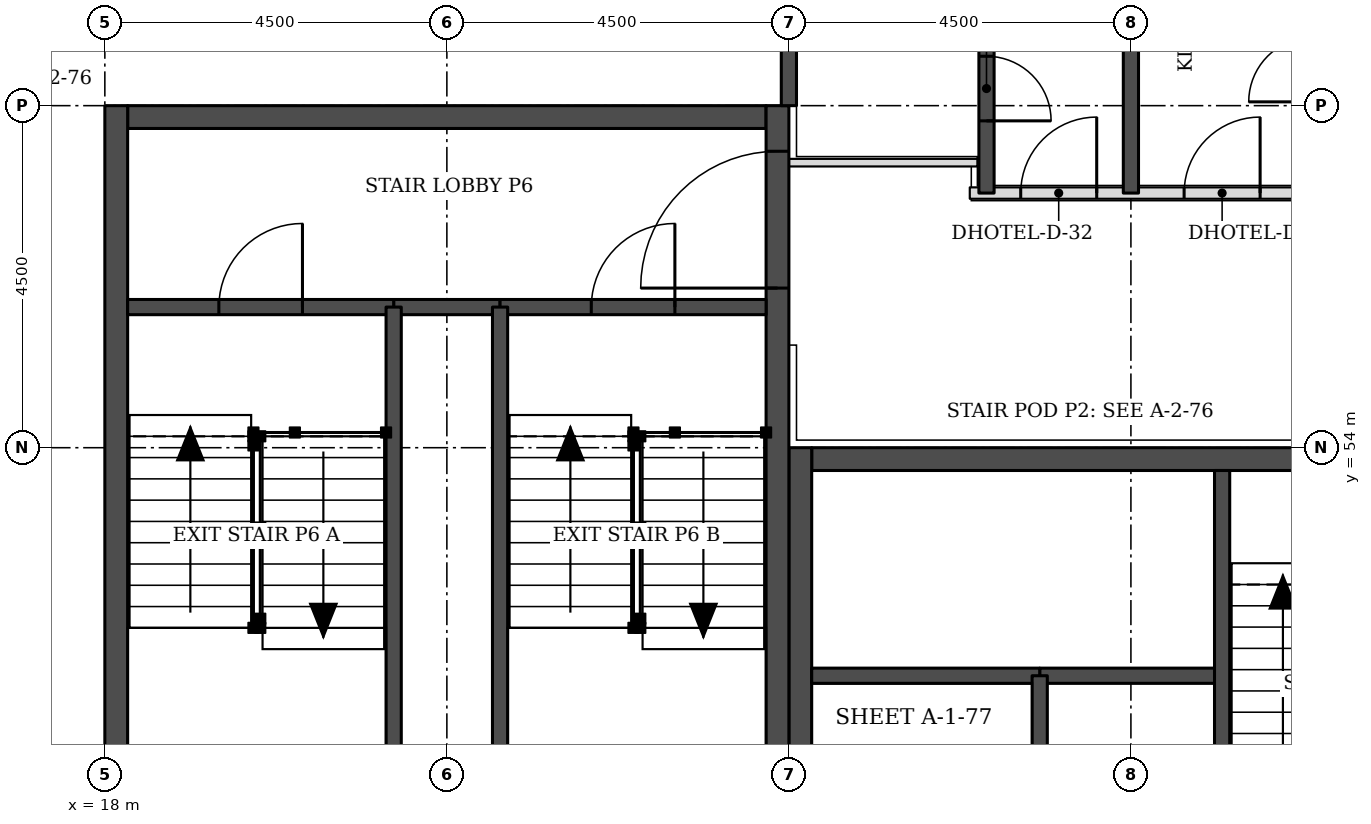
"""IFC4 building model, lengths in metres.
Left out: names, types, materials, properties, quantities, classifications, styles, units other than length and angle.
Written with IfcOpenShell. Run it as: python <this file> out.ifc"""

import sys

from ifc_helpers import new_model, si_unit, direction, frame, frame_2d, origin, place, context, subcontext, project, spatial, rectangle, extrude, element, fill, save


model = new_model("IFC4")
c1 = context("Model", 3, precision=1e-05, world=origin(), true_north=direction((0.0, 1.0)))
c2 = subcontext(c1, "Body", "Model", "MODEL_VIEW")
j1 = project(units=[si_unit("LENGTHUNIT", "METRE"), si_unit("PLANEANGLEUNIT", "RADIAN")], contexts=[c1])
p1 = place(None, origin())
s1 = spatial("IfcSite", under=j1, at=p1, CompositionType="ELEMENT")
p2 = place(p1, origin())
s2 = spatial("IfcBuilding", under=s1, at=p2, CompositionType="ELEMENT")
p3 = place(p2, frame((0.0, 0.0, 36.3)))
s3 = spatial("IfcBuildingStorey", under=s2, at=p3, CompositionType="ELEMENT", Elevation=36.3)
p4 = place(p3, frame((27.3, 53.85, 0.0), z_axis=(0.0, 0.0, 1.0), x_axis=(1.0, 0.0, 0.0)))
e1 = element("IfcWall", 1, at=p4, inside=s3, PredefinedType="SHEAR", context=c2, shape_type="SweptSolid", body=[
    extrude(rectangle(XDim=8.4, YDim=0.3, at=frame_2d((4.2, 0.0))), origin(), (0.0, 0.0, 1.0), 3.3),
])
p5 = place(p4, frame((6.4, 0.0, 0.0)))
e2 = element("IfcOpeningElement", 2, at=p5, cuts=e1, PredefinedType="OPENING", context=c2, shape_type="SweptSolid", body=[
    extrude(rectangle(XDim=1.1, YDim=2.1, at=frame_2d((0.55, 1.05))), frame((0.0, 0.16, 0.0), z_axis=(0.0, -1.0, 0.0), x_axis=(1.0, 0.0, 0.0)), (0.0, 0.0, 1.0), 0.32),
])
p6 = place(p3, frame((27.15, 45.0, 0.0), z_axis=(0.0, 0.0, 1.0), x_axis=(0.0, 1.0, 0.0)))
e3 = element("IfcWall", 3, at=p6, inside=s3, PredefinedType="SHEAR", context=c2, shape_type="SweptSolid", body=[
    extrude(rectangle(XDim=9.0, YDim=0.3, at=frame_2d((4.5, 0.0))), origin(), (0.0, 0.0, 1.0), 3.3),
])
p7 = place(p6, frame((0.4, 0.0, 0.0)))
e4 = element("IfcOpeningElement", 4, at=p7, cuts=e3, PredefinedType="OPENING", context=c2, shape_type="SweptSolid", body=[
    extrude(rectangle(XDim=1.1, YDim=2.1, at=frame_2d((0.55, 1.05))), frame((0.0, 0.16, 0.0), z_axis=(0.0, -1.0, 0.0), x_axis=(1.0, 0.0, 0.0)), (0.0, 0.0, 1.0), 0.32),
])
p8 = place(p3, frame((18.3, 58.35, 0.0), z_axis=(0.0, 0.0, 1.0), x_axis=(1.0, 0.0, 0.0)))
e5 = element("IfcWall", 5, at=p8, inside=s3, PredefinedType="SHEAR", context=c2, shape_type="SweptSolid", body=[
    extrude(rectangle(XDim=8.4, YDim=0.3, at=frame_2d((4.2, 0.0))), origin(), (0.0, 0.0, 1.0), 3.3),
])
p9 = place(p3, frame((18.15, 49.5, 0.0), z_axis=(0.0, 0.0, 1.0), x_axis=(0.0, 1.0, 0.0)))
e6 = element("IfcWall", 6, at=p9, inside=s3, PredefinedType="SHEAR", context=c2, shape_type="SweptSolid", body=[
    extrude(rectangle(XDim=9.0, YDim=0.3, at=frame_2d((4.5, 0.0))), origin(), (0.0, 0.0, 1.0), 3.3),
])
p10 = place(p3, frame((26.85, 49.5, 0.0), z_axis=(0.0, 0.0, 1.0), x_axis=(0.0, 1.0, 0.0)))
e7 = element("IfcWall", 7, at=p10, inside=s3, PredefinedType="SHEAR", context=c2, shape_type="SweptSolid", body=[
    extrude(rectangle(XDim=9.0, YDim=0.3, at=frame_2d((4.5, 0.0))), origin(), (0.0, 0.0, 1.0), 3.3),
])
p11 = place(p10, frame((6.6, 0.0, 0.0)))
e8 = element("IfcOpeningElement", 8, at=p11, cuts=e7, PredefinedType="OPENING", context=c2, shape_type="SweptSolid", body=[
    extrude(rectangle(XDim=1.8, YDim=2.1, at=frame_2d((0.9, 1.05))), frame((0.0, 0.16, 0.0), z_axis=(0.0, -1.0, 0.0), x_axis=(1.0, 0.0, 0.0)), (0.0, 0.0, 1.0), 0.32),
])
p12 = place(p3, frame((17.73, 63.826, 0.0), z_axis=(0.0, 0.0, 1.0), x_axis=(-0.707106781187, -0.707106781187, 0.0)))
e9 = element("IfcWall", 9, at=p12, inside=s3, PredefinedType="STANDARD", context=c2, shape_type="SweptSolid", body=[
    extrude(rectangle(XDim=7.151, YDim=0.35, at=frame_2d((3.576, 0.0))), origin(), (0.0, 0.0, 1.0), 3.055),
])
p13 = place(p12, frame((1.926, 0.0, 0.8)))
e10 = element("IfcOpeningElement", 10, at=p13, cuts=e9, PredefinedType="OPENING", context=c2, shape_type="SweptSolid", body=[
    extrude(rectangle(XDim=3.3, YDim=1.5, at=frame_2d((1.65, 0.75))), frame((0.0, 0.185, 0.0), z_axis=(0.0, -1.0, 0.0), x_axis=(1.0, 0.0, 0.0)), (0.0, 0.0, 1.0), 0.37),
])
p14 = place(p3, frame((29.38, 57.35, 0.0), z_axis=(0.0, 0.0, 1.0), x_axis=(1.0, 0.0, 0.0)))
e11 = element("IfcWall", 11, at=p14, inside=s3, PredefinedType="PARTITIONING", context=c2, shape_type="SweptSolid", body=[
    extrude(rectangle(XDim=13.62, YDim=0.15, at=frame_2d((6.81, 0.0))), origin(), (0.0, 0.0, 1.0), 3.08),
])
p15 = place(p14, frame((2.82, 0.0, 0.0)))
e12 = element("IfcOpeningElement", 12, at=p15, cuts=e11, PredefinedType="OPENING", context=c2, shape_type="SweptSolid", body=[
    extrude(rectangle(XDim=1.0, YDim=2.1, at=frame_2d((0.5, 1.05))), frame((0.0, 0.085, 0.0), z_axis=(0.0, -1.0, 0.0), x_axis=(1.0, 0.0, 0.0)), (0.0, 0.0, 1.0), 0.17),
])
p16 = place(p14, frame((0.67, 0.0, 0.0)))
e13 = element("IfcOpeningElement", 13, at=p16, cuts=e11, PredefinedType="OPENING", context=c2, shape_type="SweptSolid", body=[
    extrude(rectangle(XDim=1.0, YDim=2.1, at=frame_2d((0.5, 1.05))), frame((0.0, 0.085, 0.0), z_axis=(0.0, -1.0, 0.0), x_axis=(1.0, 0.0, 0.0)), (0.0, 0.0, 1.0), 0.17),
])
p17 = place(p14, frame((9.67, 0.0, 0.0)))
e14 = element("IfcOpeningElement", 14, at=p17, cuts=e11, PredefinedType="OPENING", context=c2, shape_type="SweptSolid", body=[
    extrude(rectangle(XDim=0.9, YDim=2.1, at=frame_2d((0.45, 1.05))), frame((0.0, 0.085, 0.0), z_axis=(0.0, -1.0, 0.0), x_axis=(1.0, 0.0, 0.0)), (0.0, 0.0, 1.0), 0.17),
])
p18 = place(p3, frame((27.0, 58.5, 0.0), z_axis=(0.0, 0.0, 1.0), x_axis=(0.0, 1.0, 0.0)))
e15 = element("IfcWall", 15, at=p18, inside=s3, PredefinedType="SOLIDWALL", context=c2, shape_type="SweptSolid", body=[
    extrude(rectangle(XDim=3.9, YDim=0.2, at=frame_2d((1.95, 0.0))), origin(), (0.0, 0.0, 1.0), 3.08),
])
p19 = place(p3, frame((29.6, 57.35, 0.0), z_axis=(0.0, 0.0, 1.0), x_axis=(0.0, 1.0, 0.0)))
e16 = element("IfcWall", 16, at=p19, inside=s3, PredefinedType="SOLIDWALL", context=c2, shape_type="SweptSolid", body=[
    extrude(rectangle(XDim=2.75, YDim=0.2, at=frame_2d((1.375, 0.0))), origin(), (0.0, 0.0, 1.0), 3.08),
])
p20 = place(p19, frame((0.95, 0.0, 0.0)))
e17 = element("IfcOpeningElement", 17, at=p20, cuts=e16, PredefinedType="OPENING", context=c2, shape_type="SweptSolid", body=[
    extrude(rectangle(XDim=0.85, YDim=2.1, at=frame_2d((0.425, 1.05))), frame((0.0, 0.11, 0.0), z_axis=(0.0, -1.0, 0.0), x_axis=(1.0, 0.0, 0.0)), (0.0, 0.0, 1.0), 0.22),
])
p21 = place(p3, frame((31.5, 57.35, 0.0), z_axis=(0.0, 0.0, 1.0), x_axis=(0.0, 1.0, 0.0)))
e18 = element("IfcWall", 18, at=p21, inside=s3, PredefinedType="SOLIDWALL", context=c2, shape_type="SweptSolid", body=[
    extrude(rectangle(XDim=5.05, YDim=0.2, at=frame_2d((2.525, 0.0))), origin(), (0.0, 0.0, 1.0), 3.08),
])
p22 = place(p3, frame((27.0, 57.75, 0.0), z_axis=(0.0, 0.0, 1.0), x_axis=(1.0, 0.0, 0.0)))
e19 = element("IfcWall", 19, at=p22, inside=s3, PredefinedType="PARTITIONING", context=c2, shape_type="SweptSolid", body=[
    extrude(rectangle(XDim=2.48, YDim=0.1, at=frame_2d((1.24, 0.0))), origin(), (0.0, 0.0, 1.0), 3.08),
])
p23 = place(p3, frame((30.3, 51.0, 0.0), z_axis=(0.0, 0.0, 1.0), x_axis=(1.0, 0.0, 0.0)))
e20 = element("IfcWall", 20, at=p23, inside=s3, PredefinedType="SOLIDWALL", context=c2, shape_type="SweptSolid", body=[
    extrude(rectangle(XDim=2.4, YDim=0.2, at=frame_2d((1.2, 0.0))), origin(), (0.0, 0.0, 1.0), 3.3),
])
p24 = place(p3, frame((27.3, 51.0, 0.0), z_axis=(0.0, 0.0, 1.0), x_axis=(1.0, 0.0, 0.0)))
e21 = element("IfcWall", 21, at=p24, inside=s3, PredefinedType="SOLIDWALL", context=c2, shape_type="SweptSolid", body=[
    extrude(rectangle(XDim=3.0, YDim=0.2, at=frame_2d((1.5, 0.0))), origin(), (0.0, 0.0, 1.0), 3.08),
])
for number, where, z_axis, x_axis in (
    (22, (30.3, 45.3, 0.0), (0.0, 0.0, 1.0), (0.0, 1.0, 0.0)),
    (23, (32.7, 48.0, 0.0), (0.0, 0.0, 1.0), (0.0, 1.0, 0.0)),
):
    element("IfcWall", number, at=place(p3, frame(where, z_axis=z_axis, x_axis=x_axis)), inside=s3, PredefinedType="SOLIDWALL", context=c2, shape_type="SweptSolid", body=[
        extrude(rectangle(XDim=5.7, YDim=0.2, at=frame_2d((2.85, 0.0))), origin(), (0.0, 0.0, 1.0), 3.08),
    ])
p25 = place(p3, frame((21.8, 55.85, 0.0), z_axis=(0.0, 0.0, 1.0), x_axis=(1.0, 0.0, 0.0)))
e24 = element("IfcWall", 24, at=p25, inside=s3, PredefinedType="SOLIDWALL", context=c2, shape_type="SweptSolid", body=[
    extrude(rectangle(XDim=1.4, YDim=0.2, at=frame_2d((0.7, 0.0))), origin(), (0.0, 0.0, 1.0), 3.08),
])
p26 = place(p3, frame((18.3, 55.85, 0.0), z_axis=(0.0, 0.0, 1.0), x_axis=(1.0, 0.0, 0.0)))
e25 = element("IfcWall", 25, at=p26, inside=s3, PredefinedType="SOLIDWALL", context=c2, shape_type="SweptSolid", body=[
    extrude(rectangle(XDim=3.5, YDim=0.2, at=frame_2d((1.75, 0.0))), origin(), (0.0, 0.0, 1.0), 3.08),
])
p27 = place(p26, frame((1.2, 0.0, 0.0)))
e26 = element("IfcOpeningElement", 26, at=p27, cuts=e25, PredefinedType="OPENING", context=c2, shape_type="SweptSolid", body=[
    extrude(rectangle(XDim=1.1, YDim=2.1, at=frame_2d((0.55, 1.05))), frame((0.0, 0.11, 0.0), z_axis=(0.0, -1.0, 0.0), x_axis=(1.0, 0.0, 0.0)), (0.0, 0.0, 1.0), 0.22),
])
p28 = place(p3, frame((23.2, 55.85, 0.0), z_axis=(0.0, 0.0, 1.0), x_axis=(1.0, 0.0, 0.0)))
e27 = element("IfcWall", 27, at=p28, inside=s3, PredefinedType="SOLIDWALL", context=c2, shape_type="SweptSolid", body=[
    extrude(rectangle(XDim=3.5, YDim=0.2, at=frame_2d((1.75, 0.0))), origin(), (0.0, 0.0, 1.0), 3.08),
])
p29 = place(p28, frame((1.2, 0.0, 0.0)))
e28 = element("IfcOpeningElement", 28, at=p29, cuts=e27, PredefinedType="OPENING", context=c2, shape_type="SweptSolid", body=[
    extrude(rectangle(XDim=1.1, YDim=2.1, at=frame_2d((0.55, 1.05))), frame((0.0, 0.11, 0.0), z_axis=(0.0, -1.0, 0.0), x_axis=(1.0, 0.0, 0.0)), (0.0, 0.0, 1.0), 0.22),
])
for number, where, z_axis, x_axis in (
    (29, (21.8, 49.8, 0.0), (0.0, 0.0, 1.0), (0.0, 1.0, 0.0)),
    (30, (23.2, 49.8, 0.0), (0.0, 0.0, 1.0), (0.0, 1.0, 0.0)),
):
    element("IfcWall", number, at=place(p3, frame(where, z_axis=z_axis, x_axis=x_axis)), inside=s3, PredefinedType="SOLIDWALL", context=c2, shape_type="SweptSolid", body=[
        extrude(rectangle(XDim=6.05, YDim=0.2, at=frame_2d((3.025, 0.0))), origin(), (0.0, 0.0, 1.0), 3.08),
    ])
p30 = place(p15, origin())
e31 = element("IfcDoor", 31, at=p30, inside=s3, OperationType="SINGLE_SWING_RIGHT", PredefinedType="DOOR", context=c2, shape_type="SweptSolid", body=[
    extrude(rectangle(XDim=1.0, YDim=2.1, at=frame_2d((0.5, 1.05))), frame((0.0, 0.025, 0.0), z_axis=(0.0, -1.0, 0.0), x_axis=(1.0, 0.0, 0.0)), (0.0, 0.0, 1.0), 0.05),
])
fill(e12, e31)
p31 = place(p16, origin())
e32 = element("IfcDoor", 32, at=p31, inside=s3, OperationType="SINGLE_SWING_RIGHT", PredefinedType="DOOR", context=c2, shape_type="SweptSolid", body=[
    extrude(rectangle(XDim=1.0, YDim=2.1, at=frame_2d((0.5, 1.05))), frame((0.0, 0.025, 0.0), z_axis=(0.0, -1.0, 0.0), x_axis=(1.0, 0.0, 0.0)), (0.0, 0.0, 1.0), 0.05),
])
fill(e13, e32)
p32 = place(p20, frame((0.85, 0.0, 0.0), z_axis=(0.0, 0.0, 1.0), x_axis=(-1.0, 0.0, 0.0)))
e33 = element("IfcDoor", 33, at=p32, inside=s3, OperationType="SINGLE_SWING_RIGHT", PredefinedType="DOOR", context=c2, shape_type="SweptSolid", body=[
    extrude(rectangle(XDim=0.85, YDim=2.1, at=frame_2d((0.425, 1.05))), frame((0.0, 0.025, 0.0), z_axis=(0.0, -1.0, 0.0), x_axis=(1.0, 0.0, 0.0)), (0.0, 0.0, 1.0), 0.05),
])
fill(e17, e33)
p33 = place(p27, origin())
e34 = element("IfcDoor", 34, at=p33, inside=s3, OperationType="SINGLE_SWING_RIGHT", PredefinedType="DOOR", context=c2, shape_type="SweptSolid", body=[
    extrude(rectangle(XDim=1.1, YDim=2.1, at=frame_2d((0.55, 1.05))), frame((0.0, 0.025, 0.0), z_axis=(0.0, -1.0, 0.0), x_axis=(1.0, 0.0, 0.0)), (0.0, 0.0, 1.0), 0.05),
])
fill(e26, e34)
p34 = place(p29, origin())
e35 = element("IfcDoor", 35, at=p34, inside=s3, OperationType="SINGLE_SWING_RIGHT", PredefinedType="DOOR", context=c2, shape_type="SweptSolid", body=[
    extrude(rectangle(XDim=1.1, YDim=2.1, at=frame_2d((0.55, 1.05))), frame((0.0, 0.025, 0.0), z_axis=(0.0, -1.0, 0.0), x_axis=(1.0, 0.0, 0.0)), (0.0, 0.0, 1.0), 0.05),
])
fill(e28, e35)
p35 = place(p11, origin())
e36 = element("IfcDoor", 36, at=p35, inside=s3, OperationType="SINGLE_SWING_LEFT", PredefinedType="DOOR", context=c2, shape_type="SweptSolid", body=[
    extrude(rectangle(XDim=1.8, YDim=2.1, at=frame_2d((0.9, 1.05))), frame((0.0, 0.025, 0.0), z_axis=(0.0, -1.0, 0.0), x_axis=(1.0, 0.0, 0.0)), (0.0, 0.0, 1.0), 0.05),
])
fill(e8, e36)
save(model, sys.argv[1])
